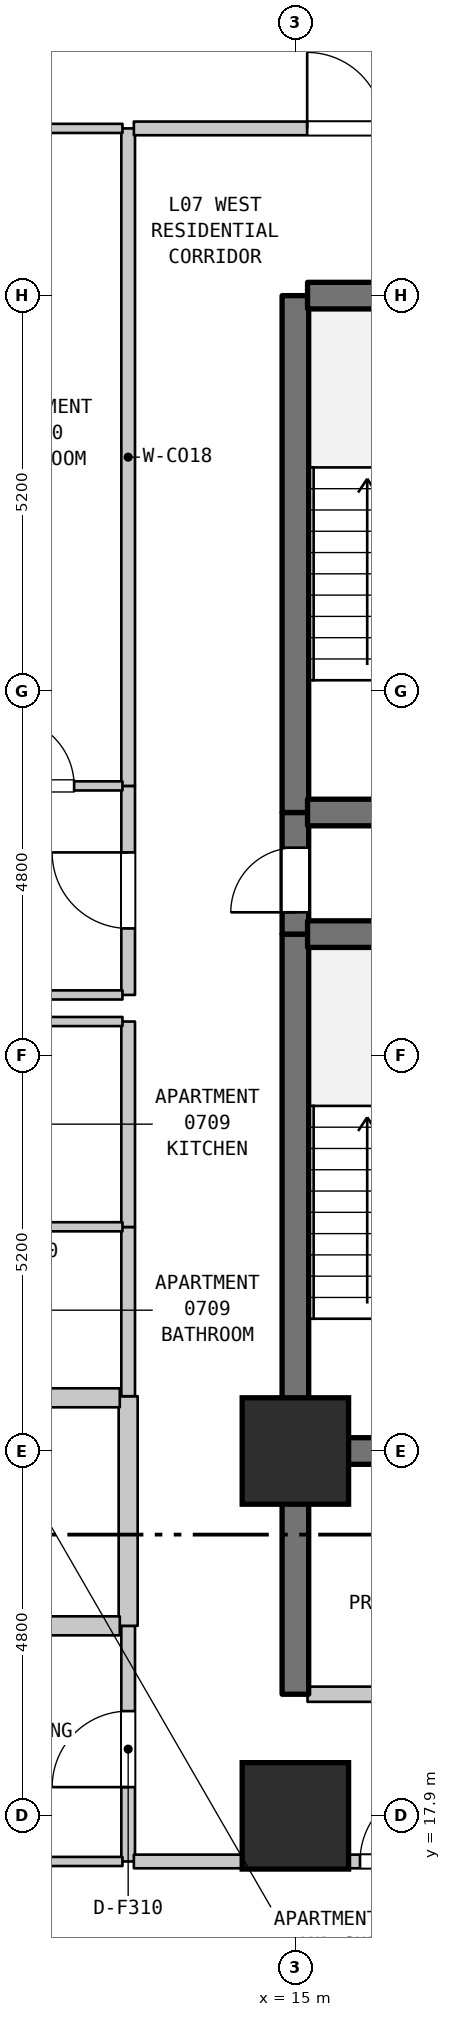
"""IFC4 building model, lengths in metres.
Left out: names, types, materials, properties, quantities, classifications, styles, units other than length and angle.
Written with IfcOpenShell. Run it as: python <this file> out.ifc"""

import sys

from ifc_helpers import new_model, si_unit, direction, frame, frame_2d, origin, origin_2d, place, context, subcontext, project, spatial, rectangle, extrude, element, fill, save


model = new_model("IFC4")
c1 = context("Model", 3, precision=1e-05, world=origin(), true_north=direction((0.0, 1.0)))
c2 = subcontext(c1, "Body", "Model", "MODEL_VIEW")
j1 = project(units=[si_unit("LENGTHUNIT", "METRE"), si_unit("PLANEANGLEUNIT", "RADIAN")], contexts=[c1])
p1 = place(None, origin())
s1 = spatial("IfcSite", under=j1, at=p1, CompositionType="ELEMENT")
p2 = place(p1, origin())
s2 = spatial("IfcBuilding", under=s1, at=p2, CompositionType="ELEMENT")
p3 = place(p2, frame((0.0, 0.0, 35.1)))
s3 = spatial("IfcBuildingStorey", under=s2, at=p3, CompositionType="ELEMENT", Elevation=35.1)
for number, where, z_axis, x_axis in (
    (1, (15.0, 17.9, 0.0), (0.0, 0.0, 1.0), (1.0, 0.0, 0.0)),
    (2, (15.0, 22.7, 0.0), (0.0, 0.0, 1.0), (1.0, 0.0, 0.0)),
):
    element("IfcColumn", number, at=place(p3, frame(where, z_axis=z_axis, x_axis=x_axis)), inside=s3, PredefinedType="COLUMN", context=c2, shape_type="SweptSolid", body=[
        extrude(rectangle(XDim=1.4, YDim=1.4, at=origin_2d()), origin(), (0.0, 0.0, 1.0), 3.7),
    ])
p4 = place(p3, frame((12.8, 17.3, 0.0), z_axis=(0.0, 0.0, 1.0), x_axis=(0.0, 1.0, 0.0)))
e3 = element("IfcWall", 3, at=p4, inside=s3, PredefinedType="STANDARD", context=c2, shape_type="SweptSolid", body=[
    extrude(rectangle(XDim=3.1, YDim=0.18, at=frame_2d((1.55, 0.0))), origin(), (0.0, 0.0, 1.0), 3.385),
])
p5 = place(p4, frame((0.978, 0.0, 0.0)))
e4 = element("IfcOpeningElement", 4, at=p5, cuts=e3, PredefinedType="OPENING", context=c2, shape_type="SweptSolid", body=[
    extrude(rectangle(XDim=1.0, YDim=2.15, at=frame_2d((0.5, 1.075))), frame((0.0, 0.1, 0.0), z_axis=(0.0, -1.0, 0.0), x_axis=(1.0, 0.0, 0.0)), (0.0, 0.0, 1.0), 0.2),
])
p6 = place(p3, frame((12.8, 20.4, 0.0), z_axis=(0.0, 0.0, 1.0), x_axis=(0.0, 1.0, 0.0)))
e5 = element("IfcWall", 5, at=p6, inside=s3, PredefinedType="STANDARD", context=c2, shape_type="SweptSolid", body=[
    extrude(rectangle(XDim=3.021, YDim=0.25, at=frame_2d((1.51, 0.0))), origin(), (0.0, 0.0, 1.0), 3.385),
])
p7 = place(p3, frame((12.8, 23.421, 0.0), z_axis=(0.0, 0.0, 1.0), x_axis=(0.0, 1.0, 0.0)))
e6 = element("IfcWall", 6, at=p7, inside=s3, PredefinedType="STANDARD", context=c2, shape_type="SweptSolid", body=[
    extrude(rectangle(XDim=2.226, YDim=0.18, at=frame_2d((1.113, 0.0))), origin(), (0.0, 0.0, 1.0), 3.385),
])
p8 = place(p3, frame((12.8, 25.647, 0.0), z_axis=(0.0, 0.0, 1.0), x_axis=(0.0, 1.0, 0.0)))
e7 = element("IfcWall", 7, at=p8, inside=s3, PredefinedType="STANDARD", context=c2, shape_type="SweptSolid", body=[
    extrude(rectangle(XDim=2.703, YDim=0.18, at=frame_2d((1.352, 0.0))), origin(), (0.0, 0.0, 1.0), 3.385),
])
p9 = place(p3, frame((12.8, 28.7, 0.0), z_axis=(0.0, 0.0, 1.0), x_axis=(0.0, 1.0, 0.0)))
e8 = element("IfcWall", 8, at=p9, inside=s3, PredefinedType="STANDARD", context=c2, shape_type="SweptSolid", body=[
    extrude(rectangle(XDim=2.75, YDim=0.18, at=frame_2d((1.375, 0.0))), origin(), (0.0, 0.0, 1.0), 3.385),
])
p10 = place(p9, frame((0.875, 0.0, 0.0)))
e9 = element("IfcOpeningElement", 9, at=p10, cuts=e8, PredefinedType="OPENING", context=c2, shape_type="SweptSolid", body=[
    extrude(rectangle(XDim=1.0, YDim=2.15, at=frame_2d((0.5, 1.075))), frame((0.0, 0.1, 0.0), z_axis=(0.0, -1.0, 0.0), x_axis=(1.0, 0.0, 0.0)), (0.0, 0.0, 1.0), 0.2),
])
p11 = place(p3, frame((12.8, 31.45, 0.0), z_axis=(0.0, 0.0, 1.0), x_axis=(0.0, 1.0, 0.0)))
e10 = element("IfcWall", 10, at=p11, inside=s3, PredefinedType="STANDARD", context=c2, shape_type="SweptSolid", body=[
    extrude(rectangle(XDim=8.65, YDim=0.18, at=frame_2d((4.325, 0.0))), origin(), (0.0, 0.0, 1.0), 3.385),
])
p12 = place(p3, frame((15.0, 19.5, 0.0), z_axis=(0.0, 0.0, 1.0), x_axis=(0.0, 1.0, 0.0)))
e11 = element("IfcWall", 11, at=p12, inside=s3, PredefinedType="SHEAR", context=c2, shape_type="SweptSolid", body=[
    extrude(rectangle(XDim=3.2, YDim=0.35, at=frame_2d((1.6, 0.0))), origin(), (0.0, 0.0, 1.0), 3.385),
])
p13 = place(p3, frame((15.0, 22.7, 0.0), z_axis=(0.0, 0.0, 1.0), x_axis=(0.0, 1.0, 0.0)))
e12 = element("IfcWall", 12, at=p13, inside=s3, PredefinedType="SHEAR", context=c2, shape_type="SweptSolid", body=[
    extrude(rectangle(XDim=6.8, YDim=0.35, at=frame_2d((3.4, 0.0))), origin(), (0.0, 0.0, 1.0), 3.385),
])
p14 = place(p3, frame((15.0, 29.5, 0.0), z_axis=(0.0, 0.0, 1.0), x_axis=(0.0, 1.0, 0.0)))
e13 = element("IfcWall", 13, at=p14, inside=s3, PredefinedType="SHEAR", context=c2, shape_type="SweptSolid", body=[
    extrude(rectangle(XDim=1.6, YDim=0.35, at=frame_2d((0.8, 0.0))), origin(), (0.0, 0.0, 1.0), 3.385),
])
p15 = place(p14, frame((0.287, 0.0, 0.0)))
e14 = element("IfcOpeningElement", 14, at=p15, cuts=e13, PredefinedType="OPENING", context=c2, shape_type="SweptSolid", body=[
    extrude(rectangle(XDim=0.85, YDim=2.1, at=frame_2d((0.425, 1.05))), frame((0.0, 0.185, 0.0), z_axis=(0.0, -1.0, 0.0), x_axis=(1.0, 0.0, 0.0)), (0.0, 0.0, 1.0), 0.37),
])
p16 = place(p3, frame((15.0, 31.1, 0.0), z_axis=(0.0, 0.0, 1.0), x_axis=(0.0, 1.0, 0.0)))
e15 = element("IfcWall", 15, at=p16, inside=s3, PredefinedType="SHEAR", context=c2, shape_type="SweptSolid", body=[
    extrude(rectangle(XDim=6.8, YDim=0.35, at=frame_2d((3.4, 0.0))), origin(), (0.0, 0.0, 1.0), 3.385),
])
p17 = place(p3, frame((9.085, 17.3, 0.0), z_axis=(0.0, 0.0, 1.0), x_axis=(1.0, 0.0, 0.0)))
e16 = element("IfcWall", 16, at=p17, inside=s3, PredefinedType="PARTITIONING", context=c2, shape_type="SweptSolid", body=[
    extrude(rectangle(XDim=3.64, YDim=0.12, at=frame_2d((1.82, 0.0))), origin(), (0.0, 0.0, 1.0), 3.385),
])
p18 = place(p3, frame((12.875, 17.3, 0.0), z_axis=(0.0, 0.0, 1.0), x_axis=(1.0, 0.0, 0.0)))
e17 = element("IfcWall", 17, at=p18, inside=s3, PredefinedType="STANDARD", context=c2, shape_type="SweptSolid", body=[
    extrude(rectangle(XDim=5.72, YDim=0.18, at=frame_2d((2.86, 0.0))), origin(), (0.0, 0.0, 1.0), 3.385),
])
p19 = place(p18, frame((2.975, 0.0, 0.0)))
e18 = element("IfcOpeningElement", 18, at=p19, cuts=e17, PredefinedType="OPENING", context=c2, shape_type="SweptSolid", body=[
    extrude(rectangle(XDim=1.0, YDim=2.15, at=frame_2d((0.5, 1.075))), frame((0.0, 0.1, 0.0), z_axis=(0.0, -1.0, 0.0), x_axis=(1.0, 0.0, 0.0)), (0.0, 0.0, 1.0), 0.2),
])
p20 = place(p3, frame((15.16, 19.5, 0.0), z_axis=(0.0, 0.0, 1.0), x_axis=(1.0, 0.0, 0.0)))
e19 = element("IfcWall", 19, at=p20, inside=s3, PredefinedType="STANDARD", context=c2, shape_type="SweptSolid", body=[
    extrude(rectangle(XDim=3.68, YDim=0.2, at=frame_2d((1.84, 0.0))), origin(), (0.0, 0.0, 1.0), 3.385),
])
p21 = place(p20, frame((1.39, 0.0, 0.0)))
e20 = element("IfcOpeningElement", 20, at=p21, cuts=e19, PredefinedType="OPENING", context=c2, shape_type="SweptSolid", body=[
    extrude(rectangle(XDim=0.9, YDim=2.15, at=frame_2d((0.45, 1.075))), frame((0.0, 0.11, 0.0), z_axis=(0.0, -1.0, 0.0), x_axis=(1.0, 0.0, 0.0)), (0.0, 0.0, 1.0), 0.22),
])
p22 = place(p3, frame((10.66, 20.4, 0.0), z_axis=(0.0, 0.0, 1.0), x_axis=(1.0, 0.0, 0.0)))
e21 = element("IfcWall", 21, at=p22, inside=s3, PredefinedType="STANDARD", context=c2, shape_type="SweptSolid", body=[
    extrude(rectangle(XDim=2.03, YDim=0.25, at=frame_2d((1.015, 0.0))), origin(), (0.0, 0.0, 1.0), 3.385),
])
p23 = place(p3, frame((15.16, 22.7, 0.0), z_axis=(0.0, 0.0, 1.0), x_axis=(1.0, 0.0, 0.0)))
e22 = element("IfcWall", 22, at=p23, inside=s3, PredefinedType="SHEAR", context=c2, shape_type="SweptSolid", body=[
    extrude(rectangle(XDim=3.68, YDim=0.35, at=frame_2d((1.84, 0.0))), origin(), (0.0, 0.0, 1.0), 3.385),
])
p24 = place(p3, frame((10.66, 23.4, 0.0), z_axis=(0.0, 0.0, 1.0), x_axis=(1.0, 0.0, 0.0)))
e23 = element("IfcWall", 23, at=p24, inside=s3, PredefinedType="STANDARD", context=c2, shape_type="SweptSolid", body=[
    extrude(rectangle(XDim=2.03, YDim=0.25, at=frame_2d((1.015, 0.0))), origin(), (0.0, 0.0, 1.0), 3.385),
])
for number, where, z_axis, x_axis in (
    (24, (10.595, 25.65, 0.0), (0.0, 0.0, 1.0), (1.0, 0.0, 0.0)),
    (25, (10.595, 28.35, 0.0), (0.0, 0.0, 1.0), (1.0, 0.0, 0.0)),
):
    element("IfcWall", number, at=place(p3, frame(where, z_axis=z_axis, x_axis=x_axis)), inside=s3, PredefinedType="PARTITIONING", context=c2, shape_type="SweptSolid", body=[
        extrude(rectangle(XDim=2.13, YDim=0.12, at=frame_2d((1.065, 0.0))), origin(), (0.0, 0.0, 1.0), 3.385),
    ])
p25 = place(p3, frame((9.03, 28.7, 0.0), z_axis=(0.0, 0.0, 1.0), x_axis=(1.0, 0.0, 0.0)))
e26 = element("IfcWall", 26, at=p25, inside=s3, PredefinedType="PARTITIONING", context=c2, shape_type="SweptSolid", body=[
    extrude(rectangle(XDim=3.695, YDim=0.12, at=frame_2d((1.848, 0.0))), origin(), (0.0, 0.0, 1.0), 3.385),
])
for number, where, z_axis, x_axis in (
    (27, (15.16, 29.5, 0.0), (0.0, 0.0, 1.0), (1.0, 0.0, 0.0)),
    (28, (15.16, 31.1, 0.0), (0.0, 0.0, 1.0), (1.0, 0.0, 0.0)),
):
    element("IfcWall", number, at=place(p3, frame(where, z_axis=z_axis, x_axis=x_axis)), inside=s3, PredefinedType="SHEAR", context=c2, shape_type="SweptSolid", body=[
        extrude(rectangle(XDim=3.68, YDim=0.35, at=frame_2d((1.84, 0.0))), origin(), (0.0, 0.0, 1.0), 3.385),
    ])
p26 = place(p3, frame((10.523, 31.45, 0.0), z_axis=(0.0, 0.0, 1.0), x_axis=(1.0, 0.0, 0.0)))
e29 = element("IfcWall", 29, at=p26, inside=s3, PredefinedType="PARTITIONING", context=c2, shape_type="SweptSolid", body=[
    extrude(rectangle(XDim=2.202, YDim=0.12, at=frame_2d((1.101, 0.0))), origin(), (0.0, 0.0, 1.0), 3.385),
])
p27 = place(p26, frame((0.666, 0.0, 0.0)))
e30 = element("IfcOpeningElement", 30, at=p27, cuts=e29, PredefinedType="OPENING", context=c2, shape_type="SweptSolid", body=[
    extrude(rectangle(XDim=0.9, YDim=2.1, at=frame_2d((0.45, 1.05))), frame((0.0, 0.07, 0.0), z_axis=(0.0, -1.0, 0.0), x_axis=(1.0, 0.0, 0.0)), (0.0, 0.0, 1.0), 0.14),
])
p28 = place(p3, frame((15.16, 37.9, 0.0), z_axis=(0.0, 0.0, 1.0), x_axis=(1.0, 0.0, 0.0)))
e31 = element("IfcWall", 31, at=p28, inside=s3, PredefinedType="SHEAR", context=c2, shape_type="SweptSolid", body=[
    extrude(rectangle(XDim=3.68, YDim=0.35, at=frame_2d((1.84, 0.0))), origin(), (0.0, 0.0, 1.0), 3.385),
])
p29 = place(p3, frame((10.523, 40.1, 0.0), z_axis=(0.0, 0.0, 1.0), x_axis=(1.0, 0.0, 0.0)))
e32 = element("IfcWall", 32, at=p29, inside=s3, PredefinedType="PARTITIONING", context=c2, shape_type="SweptSolid", body=[
    extrude(rectangle(XDim=2.202, YDim=0.12, at=frame_2d((1.101, 0.0))), origin(), (0.0, 0.0, 1.0), 3.385),
])
p30 = place(p3, frame((12.875, 40.1, 0.0), z_axis=(0.0, 0.0, 1.0), x_axis=(1.0, 0.0, 0.0)))
e33 = element("IfcWall", 33, at=p30, inside=s3, PredefinedType="STANDARD", context=c2, shape_type="SweptSolid", body=[
    extrude(rectangle(XDim=5.59, YDim=0.18, at=frame_2d((2.795, 0.0))), origin(), (0.0, 0.0, 1.0), 3.385),
])
p31 = place(p30, frame((2.28, 0.0, 0.0)))
e34 = element("IfcOpeningElement", 34, at=p31, cuts=e33, PredefinedType="OPENING", context=c2, shape_type="SweptSolid", body=[
    extrude(rectangle(XDim=1.0, YDim=2.15, at=frame_2d((0.5, 1.075))), frame((0.0, 0.1, 0.0), z_axis=(0.0, -1.0, 0.0), x_axis=(1.0, 0.0, 0.0)), (0.0, 0.0, 1.0), 0.2),
])
p32 = place(p5, origin())
e35 = element("IfcDoor", 35, at=p32, inside=s3, OperationType="SINGLE_SWING_LEFT", PredefinedType="DOOR", context=c2, shape_type="SweptSolid", body=[
    extrude(rectangle(XDim=1.0, YDim=2.15, at=frame_2d((0.5, 1.075))), frame((0.0, 0.025, 0.0), z_axis=(0.0, -1.0, 0.0), x_axis=(1.0, 0.0, 0.0)), (0.0, 0.0, 1.0), 0.05),
])
fill(e4, e35)
p33 = place(p10, origin())
e36 = element("IfcDoor", 36, at=p33, inside=s3, OperationType="SINGLE_SWING_RIGHT", PredefinedType="DOOR", context=c2, shape_type="SweptSolid", body=[
    extrude(rectangle(XDim=1.0, YDim=2.15, at=frame_2d((0.5, 1.075))), frame((0.0, 0.025, 0.0), z_axis=(0.0, -1.0, 0.0), x_axis=(1.0, 0.0, 0.0)), (0.0, 0.0, 1.0), 0.05),
])
fill(e9, e36)
p34 = place(p15, origin())
e37 = element("IfcDoor", 37, at=p34, inside=s3, OperationType="SINGLE_SWING_LEFT", PredefinedType="DOOR", context=c2, shape_type="SweptSolid", body=[
    extrude(rectangle(XDim=0.85, YDim=2.1, at=frame_2d((0.425, 1.05))), frame((0.0, 0.025, 0.0), z_axis=(0.0, -1.0, 0.0), x_axis=(1.0, 0.0, 0.0)), (0.0, 0.0, 1.0), 0.05),
])
fill(e14, e37)
p35 = place(p19, origin())
e38 = element("IfcDoor", 38, at=p35, inside=s3, OperationType="SINGLE_SWING_RIGHT", PredefinedType="DOOR", context=c2, shape_type="SweptSolid", body=[
    extrude(rectangle(XDim=1.0, YDim=2.15, at=frame_2d((0.5, 1.075))), frame((0.0, 0.025, 0.0), z_axis=(0.0, -1.0, 0.0), x_axis=(1.0, 0.0, 0.0)), (0.0, 0.0, 1.0), 0.05),
])
fill(e18, e38)
p36 = place(p27, origin())
e39 = element("IfcDoor", 39, at=p36, inside=s3, OperationType="SINGLE_SWING_LEFT", PredefinedType="DOOR", context=c2, shape_type="SweptSolid", body=[
    extrude(rectangle(XDim=0.9, YDim=2.1, at=frame_2d((0.45, 1.05))), frame((0.0, 0.025, 0.0), z_axis=(0.0, -1.0, 0.0), x_axis=(1.0, 0.0, 0.0)), (0.0, 0.0, 1.0), 0.05),
])
fill(e30, e39)
p37 = place(p31, origin())
e40 = element("IfcDoor", 40, at=p37, inside=s3, OperationType="SINGLE_SWING_LEFT", PredefinedType="DOOR", context=c2, shape_type="SweptSolid", body=[
    extrude(rectangle(XDim=1.0, YDim=2.15, at=frame_2d((0.5, 1.075))), frame((0.0, 0.025, 0.0), z_axis=(0.0, -1.0, 0.0), x_axis=(1.0, 0.0, 0.0)), (0.0, 0.0, 1.0), 0.05),
])
fill(e34, e40)
save(model, sys.argv[1])
